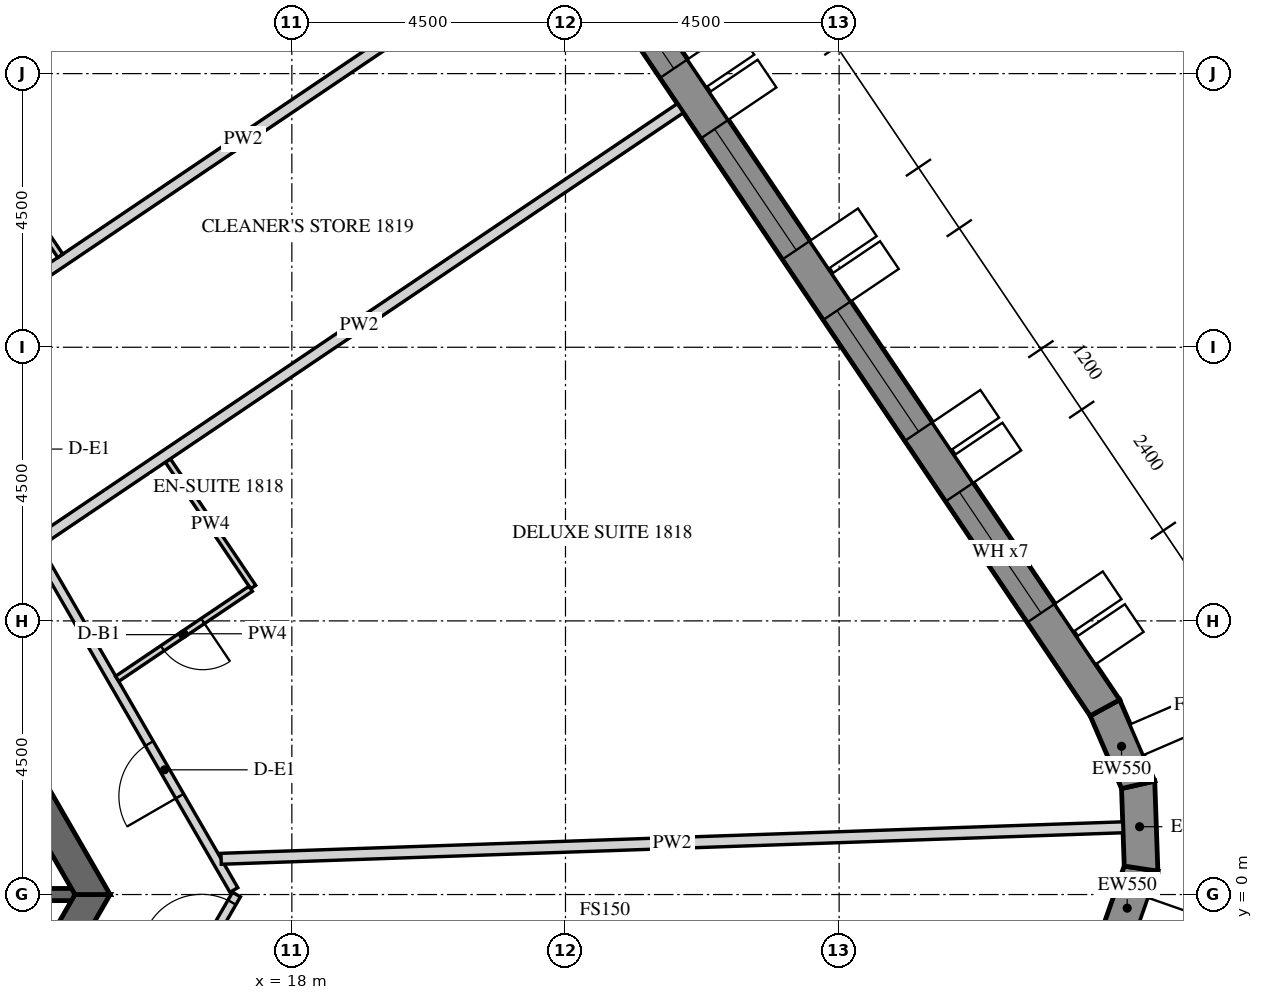
"""IFC4 building model, lengths in metres.
Left out: names, types, materials, properties, quantities, classifications, styles, units other than length and angle.
Written with IfcOpenShell. Run it as: python <this file> out.ifc"""

import sys

from ifc_helpers import new_model, si_unit, direction, frame, frame_2d, origin, place, context, subcontext, project, spatial, polyline, rectangle, outline, extrude, element, fill, save


model = new_model("IFC4")
c1 = context("Model", 3, precision=1e-05, world=origin(), true_north=direction((0.0, 1.0)))
c2 = subcontext(c1, "Body", "Model", "MODEL_VIEW")
j1 = project(units=[si_unit("LENGTHUNIT", "METRE"), si_unit("PLANEANGLEUNIT", "RADIAN")], contexts=[c1])
p1 = place(None, origin())
s1 = spatial("IfcSite", under=j1, at=p1, CompositionType="ELEMENT")
p2 = place(p1, origin())
s2 = spatial("IfcBuilding", under=s1, at=p2, CompositionType="ELEMENT")
p3 = place(p2, frame((0.0, 0.0, 226.8)))
s3 = spatial("IfcBuildingStorey", under=s2, at=p3, CompositionType="ELEMENT", Elevation=226.8)
p4 = place(p3, frame((31.509, -0.875, -0.15), z_axis=(0.0, 0.0, 1.0), x_axis=(0.33111537203, 0.943590276765, 0.0)))
e1 = element("IfcWall", 1, at=p4, inside=s3, PredefinedType="SOLIDWALL", context=c2, shape_type="SweptSolid", body=[
    extrude(outline(polyline([(-0.026, -0.275), (1.431, -0.275), (1.327, 0.275), (0.026, 0.275), (-0.026, -0.275)])), origin(), (0.0, 0.0, 1.0), 3.9),
])
p5 = place(p3, frame((31.966, 0.426, -0.15), z_axis=(0.0, 0.0, 1.0), x_axis=(-0.034876908462, 0.999391615562, 0.0)))
e2 = element("IfcWall", 2, at=p5, inside=s3, PredefinedType="SOLIDWALL", context=c2, shape_type="SweptSolid", body=[
    extrude(outline(polyline([(-0.052, -0.275), (1.431, -0.275), (1.327, 0.275), (0.052, 0.275), (-0.052, -0.275)])), origin(), (0.0, 0.0, 1.0), 3.9),
])
p6 = place(p3, frame((31.917, 1.804, -0.15), z_axis=(0.0, 0.0, 1.0), x_axis=(-0.396225741392, 0.918153125496, 0.0)))
e3 = element("IfcWall", 3, at=p6, inside=s3, PredefinedType="SOLIDWALL", context=c2, shape_type="SweptSolid", body=[
    extrude(outline(polyline([(-0.052, -0.275), (1.405, -0.275), (1.353, 0.275), (0.052, 0.275), (-0.052, -0.275)])), origin(), (0.0, 0.0, 1.0), 3.9),
])
p7 = place(p3, frame((31.371, 3.071, -0.15), z_axis=(0.0, 0.0, 1.0), x_axis=(-0.559189891278, 0.829039604297, 0.0)))
e4 = element("IfcWall", 4, at=p7, inside=s3, PredefinedType="SOLIDWALL", context=c2, shape_type="SweptSolid", body=[
    extrude(outline(polyline([(-0.026, -0.275), (27.781, -0.275), (27.736, 0.275), (0.026, 0.275), (-0.026, -0.275)])), origin(), (0.0, 0.0, 1.0), 3.9),
])
p8 = place(p7, frame((1.879, 0.0, 1.05)))
e5 = element("IfcOpeningElement", 5, at=p8, cuts=e4, PredefinedType="OPENING", context=c2, shape_type="SweptSolid", body=[
    extrude(rectangle(XDim=2.4, YDim=2.4, at=frame_2d((1.2, 1.2))), frame((0.0, 0.285, 0.0), z_axis=(0.0, -1.0, 0.0), x_axis=(1.0, 0.0, 0.0)), (0.0, 0.0, 1.0), 0.57),
])
p9 = place(p7, frame((5.479, 0.0, 1.05)))
e6 = element("IfcOpeningElement", 6, at=p9, cuts=e4, PredefinedType="OPENING", context=c2, shape_type="SweptSolid", body=[
    extrude(rectangle(XDim=2.4, YDim=2.4, at=frame_2d((1.2, 1.2))), frame((0.0, 0.285, 0.0), z_axis=(0.0, -1.0, 0.0), x_axis=(1.0, 0.0, 0.0)), (0.0, 0.0, 1.0), 0.57),
])
p10 = place(p7, frame((9.079, 0.0, 1.05)))
e7 = element("IfcOpeningElement", 7, at=p10, cuts=e4, PredefinedType="OPENING", context=c2, shape_type="SweptSolid", body=[
    extrude(rectangle(XDim=2.4, YDim=2.4, at=frame_2d((1.2, 1.2))), frame((0.0, 0.285, 0.0), z_axis=(0.0, -1.0, 0.0), x_axis=(1.0, 0.0, 0.0)), (0.0, 0.0, 1.0), 0.57),
])
p11 = place(p7, frame((12.679, 0.0, 1.05)))
e8 = element("IfcOpeningElement", 8, at=p11, cuts=e4, PredefinedType="OPENING", context=c2, shape_type="SweptSolid", body=[
    extrude(rectangle(XDim=2.4, YDim=2.4, at=frame_2d((1.2, 1.2))), frame((0.0, 0.285, 0.0), z_axis=(0.0, -1.0, 0.0), x_axis=(1.0, 0.0, 0.0)), (0.0, 0.0, 1.0), 0.57),
])
p12 = place(p7, frame((16.279, 0.0, 1.05)))
e9 = element("IfcOpeningElement", 9, at=p12, cuts=e4, PredefinedType="OPENING", context=c2, shape_type="SweptSolid", body=[
    extrude(rectangle(XDim=2.4, YDim=2.4, at=frame_2d((1.2, 1.2))), frame((0.0, 0.285, 0.0), z_axis=(0.0, -1.0, 0.0), x_axis=(1.0, 0.0, 0.0)), (0.0, 0.0, 1.0), 0.57),
])
p13 = place(p7, frame((19.879, 0.0, 1.05)))
e10 = element("IfcOpeningElement", 10, at=p13, cuts=e4, PredefinedType="OPENING", context=c2, shape_type="SweptSolid", body=[
    extrude(rectangle(XDim=2.4, YDim=2.4, at=frame_2d((1.2, 1.2))), frame((0.0, 0.285, 0.0), z_axis=(0.0, -1.0, 0.0), x_axis=(1.0, 0.0, 0.0)), (0.0, 0.0, 1.0), 0.57),
])
p14 = place(p7, frame((23.479, 0.0, 1.05)))
e11 = element("IfcOpeningElement", 11, at=p14, cuts=e4, PredefinedType="OPENING", context=c2, shape_type="SweptSolid", body=[
    extrude(rectangle(XDim=2.4, YDim=2.4, at=frame_2d((1.2, 1.2))), frame((0.0, 0.285, 0.0), z_axis=(0.0, -1.0, 0.0), x_axis=(1.0, 0.0, 0.0)), (0.0, 0.0, 1.0), 0.57),
])
p15 = place(p3, frame((7.361, -12.75, -0.15), z_axis=(0.0, 0.0, 1.0), x_axis=(0.50000571537, 0.866022103989, 0.0)))
e12 = element("IfcWall", 12, at=p15, inside=s3, PredefinedType="SHEAR", context=c2, shape_type="SweptSolid", body=[
    extrude(outline(polyline([(-0.144, -0.25), (14.867, -0.25), (14.578, 0.25), (0.144, 0.25), (-0.144, -0.25)])), origin(), (0.0, 0.0, 1.0), 3.9),
])
p16 = place(p15, frame((6.49, 0.0, 0.15)))
e13 = element("IfcOpeningElement", 13, at=p16, cuts=e12, PredefinedType="OPENING", context=c2, shape_type="SweptSolid", body=[
    extrude(rectangle(XDim=1.8, YDim=2.4, at=frame_2d((0.9, 1.2))), frame((0.0, 0.26, 0.0), z_axis=(0.0, -1.0, 0.0), x_axis=(1.0, 0.0, 0.0)), (0.0, 0.0, 1.0), 0.52),
])
p17 = place(p3, frame((14.722, 0.0, -0.15), z_axis=(0.0, 0.0, 1.0), x_axis=(-0.50000571537, 0.866022103989, 0.0)))
e14 = element("IfcWall", 14, at=p17, inside=s3, PredefinedType="SHEAR", context=c2, shape_type="SweptSolid", body=[
    extrude(outline(polyline([(-0.144, -0.25), (14.867, -0.25), (14.578, 0.25), (0.144, 0.25), (-0.144, -0.25)])), origin(), (0.0, 0.0, 1.0), 3.9),
])
p18 = place(p17, frame((6.432, 0.0, 0.15)))
e15 = element("IfcOpeningElement", 15, at=p18, cuts=e14, PredefinedType="OPENING", context=c2, shape_type="SweptSolid", body=[
    extrude(rectangle(XDim=1.8, YDim=2.4, at=frame_2d((0.9, 1.2))), frame((0.0, 0.26, 0.0), z_axis=(0.0, -1.0, 0.0), x_axis=(1.0, 0.0, 0.0)), (0.0, 0.0, 1.0), 0.52),
])
p19 = place(p3, frame((7.506, 13.0, -0.15), z_axis=(0.0, 0.0, 1.0), x_axis=(0.499988271576, 0.866032175087, 0.0)))
e16 = element("IfcWall", 16, at=p19, inside=s3, PredefinedType="SHEAR", context=c2, shape_type="SweptSolid", body=[
    extrude(rectangle(XDim=15.424, YDim=0.5, at=frame_2d((7.712, 0.0))), origin(), (0.0, 0.0, 1.0), 3.9),
])
p20 = place(p19, frame((6.812, 0.0, 0.15)))
e17 = element("IfcOpeningElement", 17, at=p20, cuts=e16, PredefinedType="OPENING", context=c2, shape_type="SweptSolid", body=[
    extrude(rectangle(XDim=1.8, YDim=2.4, at=frame_2d((0.9, 1.2))), frame((0.0, 0.26, 0.0), z_axis=(0.0, -1.0, 0.0), x_axis=(1.0, 0.0, 0.0)), (0.0, 0.0, 1.0), 0.52),
])
p21 = place(p3, frame((11.547, 0.0, -0.15), z_axis=(0.0, 0.0, 1.0), x_axis=(1.0, 0.0, 0.0)))
e18 = element("IfcWall", 18, at=p21, inside=s3, PredefinedType="SHEAR", context=c2, shape_type="SweptSolid", body=[
    extrude(rectangle(XDim=2.887, YDim=0.2, at=frame_2d((1.443, 0.0))), origin(), (0.0, 0.0, 1.0), 3.9),
])
p22 = place(p3, frame((9.772, -12.675, 0.0), z_axis=(0.0, 0.0, 1.0), x_axis=(0.499996322767, 0.866027526826, 0.0)))
e19 = element("IfcWall", 19, at=p22, inside=s3, PredefinedType="PARTITIONING", context=c2, shape_type="SweptSolid", body=[
    extrude(rectangle(XDim=14.636, YDim=0.15, at=frame_2d((7.318, 0.0))), origin(), (0.0, 0.0, 1.0), 2.988),
])
p23 = place(p22, frame((5.309, 0.0, 0.0)))
e20 = element("IfcOpeningElement", 20, at=p23, cuts=e19, PredefinedType="OPENING", context=c2, shape_type="SweptSolid", body=[
    extrude(rectangle(XDim=1.0, YDim=2.1, at=frame_2d((0.5, 1.05))), frame((0.0, 0.085, 0.0), z_axis=(0.0, -1.0, 0.0), x_axis=(1.0, 0.0, 0.0)), (0.0, 0.0, 1.0), 0.17),
])
p24 = place(p22, frame((13.486, 0.0, 0.0)))
e21 = element("IfcOpeningElement", 21, at=p24, cuts=e19, PredefinedType="OPENING", context=c2, shape_type="SweptSolid", body=[
    extrude(rectangle(XDim=1.0, YDim=2.1, at=frame_2d((0.5, 1.05))), frame((0.0, 0.085, 0.0), z_axis=(0.0, -1.0, 0.0), x_axis=(1.0, 0.0, 0.0)), (0.0, 0.0, 1.0), 0.17),
])
p25 = place(p3, frame((17.046, 0.075, 0.0), z_axis=(0.0, 0.0, 1.0), x_axis=(-0.499996322767, 0.866027526826, 0.0)))
e22 = element("IfcWall", 22, at=p25, inside=s3, PredefinedType="PARTITIONING", context=c2, shape_type="SweptSolid", body=[
    extrude(rectangle(XDim=14.636, YDim=0.15, at=frame_2d((7.318, 0.0))), origin(), (0.0, 0.0, 1.0), 2.988),
])
p26 = place(p25, frame((1.781, 0.0, 0.0)))
e23 = element("IfcOpeningElement", 23, at=p26, cuts=e22, PredefinedType="OPENING", context=c2, shape_type="SweptSolid", body=[
    extrude(rectangle(XDim=1.0, YDim=2.1, at=frame_2d((0.5, 1.05))), frame((0.0, 0.085, 0.0), z_axis=(0.0, -1.0, 0.0), x_axis=(1.0, 0.0, 0.0)), (0.0, 0.0, 1.0), 0.17),
])
p27 = place(p25, frame((7.872, 0.0, 0.0)))
e24 = element("IfcOpeningElement", 24, at=p27, cuts=e22, PredefinedType="OPENING", context=c2, shape_type="SweptSolid", body=[
    extrude(rectangle(XDim=1.0, YDim=2.1, at=frame_2d((0.5, 1.05))), frame((0.0, 0.085, 0.0), z_axis=(0.0, -1.0, 0.0), x_axis=(1.0, 0.0, 0.0)), (0.0, 0.0, 1.0), 0.17),
])
p28 = place(p25, frame((13.203, 0.0, 0.0)))
e25 = element("IfcOpeningElement", 25, at=p28, cuts=e22, PredefinedType="OPENING", context=c2, shape_type="SweptSolid", body=[
    extrude(rectangle(XDim=1.0, YDim=2.1, at=frame_2d((0.5, 1.05))), frame((0.0, 0.085, 0.0), z_axis=(0.0, -1.0, 0.0), x_axis=(1.0, 0.0, 0.0)), (0.0, 0.0, 1.0), 0.17),
])
p29 = place(p3, frame((31.667, 1.106, 0.0), z_axis=(0.0, 0.0, 1.0), x_axis=(-0.999390937365, -0.034896336667, 0.0)))
e26 = element("IfcWall", 26, at=p29, inside=s3, PredefinedType="PARTITIONING", context=c2, shape_type="SweptSolid", body=[
    extrude(rectangle(XDim=14.839, YDim=0.18, at=frame_2d((7.419, 0.0))), origin(), (0.0, 0.0, 1.0), 2.988),
])
p30 = place(p3, frame((15.961, 7.138, 0.0), z_axis=(0.0, 0.0, 1.0), x_axis=(0.559158770347, -0.829060594615, 0.0)))
e27 = element("IfcWall", 27, at=p30, inside=s3, PredefinedType="PARTITIONING", context=c2, shape_type="SweptSolid", body=[
    extrude(rectangle(XDim=2.51, YDim=0.1, at=frame_2d((1.255, 0.0))), origin(), (0.0, 0.0, 1.0), 2.988),
])
p31 = place(p3, frame((17.323, 5.029, 0.0), z_axis=(0.0, 0.0, 1.0), x_axis=(-0.829031379595, -0.559202084802, 0.0)))
e28 = element("IfcWall", 28, at=p31, inside=s3, PredefinedType="PARTITIONING", context=c2, shape_type="SweptSolid", body=[
    extrude(rectangle(XDim=2.648, YDim=0.1, at=frame_2d((1.324, 0.0))), origin(), (0.0, 0.0, 1.0), 2.988),
])
p32 = place(p31, frame((0.95, 0.0, 0.0)))
e29 = element("IfcOpeningElement", 29, at=p32, cuts=e28, PredefinedType="OPENING", context=c2, shape_type="SweptSolid", body=[
    extrude(rectangle(XDim=0.8, YDim=2.1, at=frame_2d((0.4, 1.05))), frame((0.0, 0.06, 0.0), z_axis=(0.0, -1.0, 0.0), x_axis=(1.0, 0.0, 0.0)), (0.0, 0.0, 1.0), 0.12),
])
p33 = place(p3, frame((24.389, 12.931, 0.0), z_axis=(0.0, 0.0, 1.0), x_axis=(-0.829037426209, -0.559193120438, 0.0)))
e30 = element("IfcWall", 30, at=p33, inside=s3, PredefinedType="PARTITIONING", context=c2, shape_type="SweptSolid", body=[
    extrude(rectangle(XDim=12.742, YDim=0.18, at=frame_2d((6.371, 0.0))), origin(), (0.0, 0.0, 1.0), 2.988),
])
p34 = place(p3, frame((22.376, 15.915, 0.0), z_axis=(0.0, 0.0, 1.0), x_axis=(-0.829037148953, -0.559193531487, 0.0)))
e31 = element("IfcWall", 31, at=p34, inside=s3, PredefinedType="PARTITIONING", context=c2, shape_type="SweptSolid", body=[
    extrude(rectangle(XDim=12.491, YDim=0.18, at=frame_2d((6.246, 0.0))), origin(), (0.0, 0.0, 1.0), 2.988),
])
p35 = place(p3, frame((12.816, 12.543, 0.0), z_axis=(0.0, 0.0, 1.0), x_axis=(0.559181331227, -0.829045378015, 0.0)))
e32 = element("IfcWall", 32, at=p35, inside=s3, PredefinedType="PARTITIONING", context=c2, shape_type="SweptSolid", body=[
    extrude(rectangle(XDim=2.46, YDim=0.1, at=frame_2d((1.23, 0.0))), origin(), (0.0, 0.0, 1.0), 2.988),
])
p36 = place(p8, frame((0.0, 0.205, 0.0)))
e33 = element("IfcWindow", 33, at=p36, inside=s3, PartitioningType="DOUBLE_PANEL_VERTICAL", PredefinedType="WINDOW", context=c2, shape_type="SweptSolid", body=[
    extrude(rectangle(XDim=2.4, YDim=2.4, at=frame_2d((1.2, 1.2))), frame((0.0, 0.03, 0.0), z_axis=(0.0, -1.0, 0.0), x_axis=(1.0, 0.0, 0.0)), (0.0, 0.0, 1.0), 0.06),
])
fill(e5, e33)
p37 = place(p9, frame((0.0, 0.205, 0.0)))
e34 = element("IfcWindow", 34, at=p37, inside=s3, PartitioningType="DOUBLE_PANEL_VERTICAL", PredefinedType="WINDOW", context=c2, shape_type="SweptSolid", body=[
    extrude(rectangle(XDim=2.4, YDim=2.4, at=frame_2d((1.2, 1.2))), frame((0.0, 0.03, 0.0), z_axis=(0.0, -1.0, 0.0), x_axis=(1.0, 0.0, 0.0)), (0.0, 0.0, 1.0), 0.06),
])
fill(e6, e34)
p38 = place(p10, frame((0.0, 0.205, 0.0)))
e35 = element("IfcWindow", 35, at=p38, inside=s3, PartitioningType="DOUBLE_PANEL_VERTICAL", PredefinedType="WINDOW", context=c2, shape_type="SweptSolid", body=[
    extrude(rectangle(XDim=2.4, YDim=2.4, at=frame_2d((1.2, 1.2))), frame((0.0, 0.03, 0.0), z_axis=(0.0, -1.0, 0.0), x_axis=(1.0, 0.0, 0.0)), (0.0, 0.0, 1.0), 0.06),
])
fill(e7, e35)
p39 = place(p11, frame((0.0, 0.205, 0.0)))
e36 = element("IfcWindow", 36, at=p39, inside=s3, PartitioningType="DOUBLE_PANEL_VERTICAL", PredefinedType="WINDOW", context=c2, shape_type="SweptSolid", body=[
    extrude(rectangle(XDim=2.4, YDim=2.4, at=frame_2d((1.2, 1.2))), frame((0.0, 0.03, 0.0), z_axis=(0.0, -1.0, 0.0), x_axis=(1.0, 0.0, 0.0)), (0.0, 0.0, 1.0), 0.06),
])
fill(e8, e36)
p40 = place(p24, origin())
e37 = element("IfcDoor", 37, at=p40, inside=s3, OperationType="SINGLE_SWING_LEFT", PredefinedType="DOOR", context=c2, shape_type="SweptSolid", body=[
    extrude(rectangle(XDim=1.0, YDim=2.1, at=frame_2d((0.5, 1.05))), frame((0.0, 0.025, 0.0), z_axis=(0.0, -1.0, 0.0), x_axis=(1.0, 0.0, 0.0)), (0.0, 0.0, 1.0), 0.05),
])
fill(e21, e37)
p41 = place(p26, origin())
e38 = element("IfcDoor", 38, at=p41, inside=s3, OperationType="SINGLE_SWING_LEFT", PredefinedType="DOOR", context=c2, shape_type="SweptSolid", body=[
    extrude(rectangle(XDim=1.0, YDim=2.1, at=frame_2d((0.5, 1.05))), frame((0.0, 0.025, 0.0), z_axis=(0.0, -1.0, 0.0), x_axis=(1.0, 0.0, 0.0)), (0.0, 0.0, 1.0), 0.05),
])
fill(e23, e38)
p42 = place(p32, origin())
e39 = element("IfcDoor", 39, at=p42, inside=s3, OperationType="SINGLE_SWING_LEFT", PredefinedType="DOOR", context=c2, shape_type="SweptSolid", body=[
    extrude(rectangle(XDim=0.8, YDim=2.1, at=frame_2d((0.4, 1.05))), frame((0.0, 0.025, 0.0), z_axis=(0.0, -1.0, 0.0), x_axis=(1.0, 0.0, 0.0)), (0.0, 0.0, 1.0), 0.05),
])
fill(e29, e39)
save(model, sys.argv[1])
